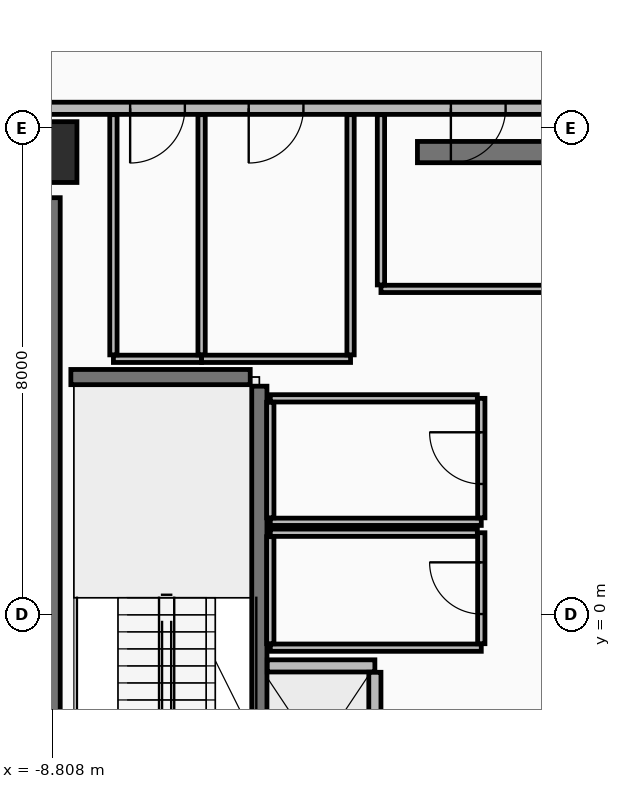
"""IFC4 building model, lengths in metres.
Left out: names, types, materials, properties, quantities, classifications, styles, units other than length and angle.
Written with IfcOpenShell. Run it as: python <this file> out.ifc"""

import sys

from ifc_helpers import new_model, si_unit, direction, frame, frame_2d, origin, origin_2d, place, context, subcontext, project, spatial, rectangle, extrude, element, fill, save


model = new_model("IFC4")
c1 = context("Model", 3, precision=1e-05, world=origin(), true_north=direction((0.0, 1.0)))
c2 = subcontext(c1, "Body", "Model", "MODEL_VIEW")
j1 = project(units=[si_unit("LENGTHUNIT", "METRE"), si_unit("PLANEANGLEUNIT", "RADIAN")], contexts=[c1])
p1 = place(None, origin())
s1 = spatial("IfcSite", under=j1, at=p1, CompositionType="ELEMENT")
p2 = place(p1, origin())
s2 = spatial("IfcBuilding", under=s1, at=p2, CompositionType="ELEMENT")
p3 = place(p2, frame((0.0, 0.0, 294.35)))
s3 = spatial("IfcBuildingStorey", under=s2, at=p3, CompositionType="ELEMENT", Elevation=294.35)
p4 = place(p3, frame((-8.9, 7.6, 0.0), z_axis=(0.0, 0.0, 1.0), x_axis=(1.0, 0.0, 0.0)))
e1 = element("IfcColumn", 1, at=p4, inside=s3, PredefinedType="COLUMN", context=c2, shape_type="SweptSolid", body=[
    extrude(rectangle(XDim=1.0, YDim=1.0, at=origin_2d()), origin(), (0.0, 0.0, 1.0), 3.65),
])
p5 = place(p3, frame((-2.8, 7.6, 0.0), z_axis=(0.0, 0.0, 1.0), x_axis=(1.0, 0.0, 0.0)))
e2 = element("IfcWall", 2, at=p5, inside=s3, PredefinedType="SHEAR", context=c2, shape_type="SweptSolid", body=[
    extrude(rectangle(XDim=5.38, YDim=0.35, at=frame_2d((2.69, 0.0))), origin(), (0.0, 0.0, 1.0), 3.45),
])
p6 = place(p3, frame((-8.9, -3.85, 0.0), z_axis=(0.0, 0.0, 1.0), x_axis=(0.0, 1.0, 0.0)))
e3 = element("IfcWall", 3, at=p6, inside=s3, PredefinedType="SHEAR", context=c2, shape_type="SweptSolid", body=[
    extrude(rectangle(XDim=10.7, YDim=0.45, at=frame_2d((5.35, 0.0))), origin(), (0.0, 0.0, 1.0), 3.45),
])
p7 = place(p3, frame((9.62, 8.32, 0.0), z_axis=(0.0, 0.0, 1.0), x_axis=(-1.0, 0.0, 0.0)))
e4 = element("IfcWall", 4, at=p7, inside=s3, PredefinedType="PARTITIONING", context=c2, shape_type="SweptSolid", body=[
    extrude(rectangle(XDim=19.24, YDim=0.2, at=frame_2d((9.62, 0.0))), origin(), (0.0, 0.0, 1.0), 2.945),
])
p8 = place(p7, frame((10.97, 0.0, 0.0)))
e5 = element("IfcOpeningElement", 5, at=p8, cuts=e4, PredefinedType="OPENING", context=c2, shape_type="SweptSolid", body=[
    extrude(rectangle(XDim=0.9, YDim=2.1, at=frame_2d((0.45, 1.05))), frame((0.0, 0.11, 0.0), z_axis=(0.0, -1.0, 0.0), x_axis=(1.0, 0.0, 0.0)), (0.0, 0.0, 1.0), 0.22),
])
p9 = place(p7, frame((7.57, 0.0, 0.0)))
e6 = element("IfcOpeningElement", 6, at=p9, cuts=e4, PredefinedType="OPENING", context=c2, shape_type="SweptSolid", body=[
    extrude(rectangle(XDim=0.9, YDim=2.1, at=frame_2d((0.45, 1.05))), frame((0.0, 0.11, 0.0), z_axis=(0.0, -1.0, 0.0), x_axis=(1.0, 0.0, 0.0)), (0.0, 0.0, 1.0), 0.22),
])
p10 = place(p7, frame((16.245, 0.0, 0.0)))
e7 = element("IfcOpeningElement", 7, at=p10, cuts=e4, PredefinedType="OPENING", context=c2, shape_type="SweptSolid", body=[
    extrude(rectangle(XDim=0.9, YDim=2.1, at=frame_2d((0.45, 1.05))), frame((0.0, 0.11, 0.0), z_axis=(0.0, -1.0, 0.0), x_axis=(1.0, 0.0, 0.0)), (0.0, 0.0, 1.0), 0.22),
])
p11 = place(p7, frame((14.295, 0.0, 0.0)))
e8 = element("IfcOpeningElement", 8, at=p11, cuts=e4, PredefinedType="OPENING", context=c2, shape_type="SweptSolid", body=[
    extrude(rectangle(XDim=0.9, YDim=2.1, at=frame_2d((0.45, 1.05))), frame((0.0, 0.11, 0.0), z_axis=(0.0, -1.0, 0.0), x_axis=(1.0, 0.0, 0.0)), (0.0, 0.0, 1.0), 0.22),
])
p12 = place(p3, frame((-5.4, -3.55, 0.0), z_axis=(0.0, 0.0, 1.0), x_axis=(0.0, 1.0, 0.0)))
e9 = element("IfcWall", 9, at=p12, inside=s3, PredefinedType="SHEAR", context=c2, shape_type="SweptSolid", body=[
    extrude(rectangle(XDim=7.3, YDim=0.25, at=frame_2d((3.65, 0.0))), origin(), (0.0, 0.0, 1.0), 3.45),
])
p13 = place(p3, frame((-8.5, 3.9, 0.0), z_axis=(0.0, 0.0, 1.0), x_axis=(1.0, 0.0, 0.0)))
e10 = element("IfcWall", 10, at=p13, inside=s3, PredefinedType="SHEAR", context=c2, shape_type="SweptSolid", body=[
    extrude(rectangle(XDim=2.95, YDim=0.25, at=frame_2d((1.475, 0.0))), origin(), (0.0, 0.0, 1.0), 3.45),
])
p14 = place(p3, frame((-5.27, -0.85, 0.0), z_axis=(0.0, 0.0, 1.0), x_axis=(1.0, 0.0, 0.0)))
e11 = element("IfcWall", 11, at=p14, inside=s3, PredefinedType="PARTITIONING", context=c2, shape_type="SweptSolid", body=[
    extrude(rectangle(XDim=1.77, YDim=0.2, at=frame_2d((0.885, 0.0))), origin(), (0.0, 0.0, 1.0), 3.45),
])
p15 = place(p3, frame((-3.5, -3.57, 0.0), z_axis=(0.0, 0.0, 1.0), x_axis=(0.0, 1.0, 0.0)))
e12 = element("IfcWall", 12, at=p15, inside=s3, PredefinedType="PARTITIONING", context=c2, shape_type="SweptSolid", body=[
    extrude(rectangle(XDim=2.615, YDim=0.2, at=frame_2d((1.308, 0.0))), origin(), (0.0, 0.0, 1.0), 3.45),
])
p16 = place(p3, frame((-5.22, 1.52, 0.0), z_axis=(0.0, 0.0, 1.0), x_axis=(1.0, 0.0, 0.0)))
e13 = element("IfcWall", 13, at=p16, inside=s3, PredefinedType="PARTITIONING", context=c2, shape_type="SweptSolid", body=[
    extrude(rectangle(XDim=3.47, YDim=0.12, at=frame_2d((1.735, 0.0))), origin(), (0.0, 0.0, 1.0), 3.45),
])
p17 = place(p3, frame((-1.75, 1.585, 0.0), z_axis=(0.0, 0.0, 1.0), x_axis=(0.0, 1.0, 0.0)))
e14 = element("IfcWall", 14, at=p17, inside=s3, PredefinedType="PARTITIONING", context=c2, shape_type="SweptSolid", body=[
    extrude(rectangle(XDim=1.965, YDim=0.12, at=frame_2d((0.982, 0.0))), origin(), (0.0, 0.0, 1.0), 3.45),
])
p18 = place(p17, frame((0.557, 0.0, 0.0)))
e15 = element("IfcOpeningElement", 15, at=p18, cuts=e14, PredefinedType="OPENING", context=c2, shape_type="SweptSolid", body=[
    extrude(rectangle(XDim=0.85, YDim=2.1, at=frame_2d((0.425, 1.05))), frame((0.0, 0.07, 0.0), z_axis=(0.0, -1.0, 0.0), x_axis=(1.0, 0.0, 0.0)), (0.0, 0.0, 1.0), 0.14),
])
p19 = place(p3, frame((-1.815, 3.55, 0.0), z_axis=(0.0, 0.0, 1.0), x_axis=(-1.0, 0.0, 0.0)))
e16 = element("IfcWall", 16, at=p19, inside=s3, PredefinedType="PARTITIONING", context=c2, shape_type="SweptSolid", body=[
    extrude(rectangle(XDim=3.405, YDim=0.12, at=frame_2d((1.703, 0.0))), origin(), (0.0, 0.0, 1.0), 3.45),
])
p20 = place(p3, frame((-5.22, 3.485, 0.0), z_axis=(0.0, 0.0, 1.0), x_axis=(0.0, -1.0, 0.0)))
e17 = element("IfcWall", 17, at=p20, inside=s3, PredefinedType="PARTITIONING", context=c2, shape_type="SweptSolid", body=[
    extrude(rectangle(XDim=1.9, YDim=0.12, at=frame_2d((0.95, 0.0))), origin(), (0.0, 0.0, 1.0), 3.45),
])
p21 = place(p3, frame((-5.22, -0.55, 0.0), z_axis=(0.0, 0.0, 1.0), x_axis=(1.0, 0.0, 0.0)))
e18 = element("IfcWall", 18, at=p21, inside=s3, PredefinedType="PARTITIONING", context=c2, shape_type="SweptSolid", body=[
    extrude(rectangle(XDim=3.47, YDim=0.12, at=frame_2d((1.735, 0.0))), origin(), (0.0, 0.0, 1.0), 3.45),
])
p22 = place(p3, frame((-1.75, -0.485, 0.0), z_axis=(0.0, 0.0, 1.0), x_axis=(0.0, 1.0, 0.0)))
e19 = element("IfcWall", 19, at=p22, inside=s3, PredefinedType="PARTITIONING", context=c2, shape_type="SweptSolid", body=[
    extrude(rectangle(XDim=1.825, YDim=0.12, at=frame_2d((0.913, 0.0))), origin(), (0.0, 0.0, 1.0), 3.45),
])
p23 = place(p22, frame((0.488, 0.0, 0.0)))
e20 = element("IfcOpeningElement", 20, at=p23, cuts=e19, PredefinedType="OPENING", context=c2, shape_type="SweptSolid", body=[
    extrude(rectangle(XDim=0.85, YDim=2.1, at=frame_2d((0.425, 1.05))), frame((0.0, 0.07, 0.0), z_axis=(0.0, -1.0, 0.0), x_axis=(1.0, 0.0, 0.0)), (0.0, 0.0, 1.0), 0.14),
])
p24 = place(p3, frame((-1.815, 1.34, 0.0), z_axis=(0.0, 0.0, 1.0), x_axis=(-1.0, 0.0, 0.0)))
e21 = element("IfcWall", 21, at=p24, inside=s3, PredefinedType="PARTITIONING", context=c2, shape_type="SweptSolid", body=[
    extrude(rectangle(XDim=3.405, YDim=0.12, at=frame_2d((1.703, 0.0))), origin(), (0.0, 0.0, 1.0), 3.45),
])
p25 = place(p3, frame((-5.22, 1.275, 0.0), z_axis=(0.0, 0.0, 1.0), x_axis=(0.0, -1.0, 0.0)))
e22 = element("IfcWall", 22, at=p25, inside=s3, PredefinedType="PARTITIONING", context=c2, shape_type="SweptSolid", body=[
    extrude(rectangle(XDim=1.76, YDim=0.12, at=frame_2d((0.88, 0.0))), origin(), (0.0, 0.0, 1.0), 3.45),
])
p26 = place(p3, frame((-3.4, 5.35, 0.0), z_axis=(0.0, 0.0, 1.0), x_axis=(1.0, 0.0, 0.0)))
e23 = element("IfcWall", 23, at=p26, inside=s3, PredefinedType="PARTITIONING", context=c2, shape_type="SweptSolid", body=[
    extrude(rectangle(XDim=3.2, YDim=0.12, at=frame_2d((1.6, 0.0))), origin(), (0.0, 0.0, 1.0), 3.45),
])
p27 = place(p3, frame((-3.4, 8.215, 0.0), z_axis=(0.0, 0.0, 1.0), x_axis=(0.0, -1.0, 0.0)))
e24 = element("IfcWall", 24, at=p27, inside=s3, PredefinedType="PARTITIONING", context=c2, shape_type="SweptSolid", body=[
    extrude(rectangle(XDim=2.8, YDim=0.12, at=frame_2d((1.4, 0.0))), origin(), (0.0, 0.0, 1.0), 2.745),
])
p28 = place(p3, frame((-7.8, 4.2, 0.0), z_axis=(0.0, 0.0, 1.0), x_axis=(1.0, 0.0, 0.0)))
e25 = element("IfcWall", 25, at=p28, inside=s3, PredefinedType="PARTITIONING", context=c2, shape_type="SweptSolid", body=[
    extrude(rectangle(XDim=1.45, YDim=0.12, at=frame_2d((0.725, 0.0))), origin(), (0.0, 0.0, 1.0), 3.45),
])
for number, where, z_axis, x_axis in (
    (26, (-6.35, 4.265, 0.0), (0.0, 0.0, 1.0), (0.0, 1.0, 0.0)),
    (27, (-7.8, 8.215, 0.0), (0.0, 0.0, 1.0), (0.0, -1.0, 0.0)),
):
    element("IfcWall", number, at=place(p3, frame(where, z_axis=z_axis, x_axis=x_axis)), inside=s3, PredefinedType="PARTITIONING", context=c2, shape_type="SweptSolid", body=[
        extrude(rectangle(XDim=3.95, YDim=0.12, at=frame_2d((1.975, 0.0))), origin(), (0.0, 0.0, 1.0), 2.745),
    ])
p29 = place(p3, frame((-6.35, 4.2, 0.0), z_axis=(0.0, 0.0, 1.0), x_axis=(1.0, 0.0, 0.0)))
e28 = element("IfcWall", 28, at=p29, inside=s3, PredefinedType="PARTITIONING", context=c2, shape_type="SweptSolid", body=[
    extrude(rectangle(XDim=2.45, YDim=0.12, at=frame_2d((1.225, 0.0))), origin(), (0.0, 0.0, 1.0), 3.45),
])
p30 = place(p3, frame((-3.9, 4.265, 0.0), z_axis=(0.0, 0.0, 1.0), x_axis=(0.0, 1.0, 0.0)))
e29 = element("IfcWall", 29, at=p30, inside=s3, PredefinedType="PARTITIONING", context=c2, shape_type="SweptSolid", body=[
    extrude(rectangle(XDim=3.95, YDim=0.12, at=frame_2d((1.975, 0.0))), origin(), (0.0, 0.0, 1.0), 2.745),
])
p31 = place(p18, frame((0.85, 0.0, 0.0), z_axis=(0.0, 0.0, 1.0), x_axis=(-1.0, 0.0, 0.0)))
e30 = element("IfcDoor", 30, at=p31, inside=s3, OperationType="SINGLE_SWING_RIGHT", PredefinedType="DOOR", context=c2, shape_type="SweptSolid", body=[
    extrude(rectangle(XDim=0.85, YDim=2.1, at=frame_2d((0.425, 1.05))), frame((0.0, 0.025, 0.0), z_axis=(0.0, -1.0, 0.0), x_axis=(1.0, 0.0, 0.0)), (0.0, 0.0, 1.0), 0.05),
])
fill(e15, e30)
p32 = place(p23, frame((0.85, 0.0, 0.0), z_axis=(0.0, 0.0, 1.0), x_axis=(-1.0, 0.0, 0.0)))
e31 = element("IfcDoor", 31, at=p32, inside=s3, OperationType="SINGLE_SWING_RIGHT", PredefinedType="DOOR", context=c2, shape_type="SweptSolid", body=[
    extrude(rectangle(XDim=0.85, YDim=2.1, at=frame_2d((0.425, 1.05))), frame((0.0, 0.025, 0.0), z_axis=(0.0, -1.0, 0.0), x_axis=(1.0, 0.0, 0.0)), (0.0, 0.0, 1.0), 0.05),
])
fill(e20, e31)
p33 = place(p8, frame((0.9, 0.0, 0.0), z_axis=(0.0, 0.0, 1.0), x_axis=(-1.0, 0.0, 0.0)))
e32 = element("IfcDoor", 32, at=p33, inside=s3, OperationType="SINGLE_SWING_LEFT", PredefinedType="DOOR", context=c2, shape_type="SweptSolid", body=[
    extrude(rectangle(XDim=0.9, YDim=2.1, at=frame_2d((0.45, 1.05))), frame((0.0, 0.025, 0.0), z_axis=(0.0, -1.0, 0.0), x_axis=(1.0, 0.0, 0.0)), (0.0, 0.0, 1.0), 0.05),
])
fill(e5, e32)
p34 = place(p10, frame((0.9, 0.0, 0.0), z_axis=(0.0, 0.0, 1.0), x_axis=(-1.0, 0.0, 0.0)))
e33 = element("IfcDoor", 33, at=p34, inside=s3, OperationType="SINGLE_SWING_LEFT", PredefinedType="DOOR", context=c2, shape_type="SweptSolid", body=[
    extrude(rectangle(XDim=0.9, YDim=2.1, at=frame_2d((0.45, 1.05))), frame((0.0, 0.025, 0.0), z_axis=(0.0, -1.0, 0.0), x_axis=(1.0, 0.0, 0.0)), (0.0, 0.0, 1.0), 0.05),
])
fill(e7, e33)
p35 = place(p11, frame((0.9, 0.0, 0.0), z_axis=(0.0, 0.0, 1.0), x_axis=(-1.0, 0.0, 0.0)))
e34 = element("IfcDoor", 34, at=p35, inside=s3, OperationType="SINGLE_SWING_LEFT", PredefinedType="DOOR", context=c2, shape_type="SweptSolid", body=[
    extrude(rectangle(XDim=0.9, YDim=2.1, at=frame_2d((0.45, 1.05))), frame((0.0, 0.025, 0.0), z_axis=(0.0, -1.0, 0.0), x_axis=(1.0, 0.0, 0.0)), (0.0, 0.0, 1.0), 0.05),
])
fill(e8, e34)
save(model, sys.argv[1])
